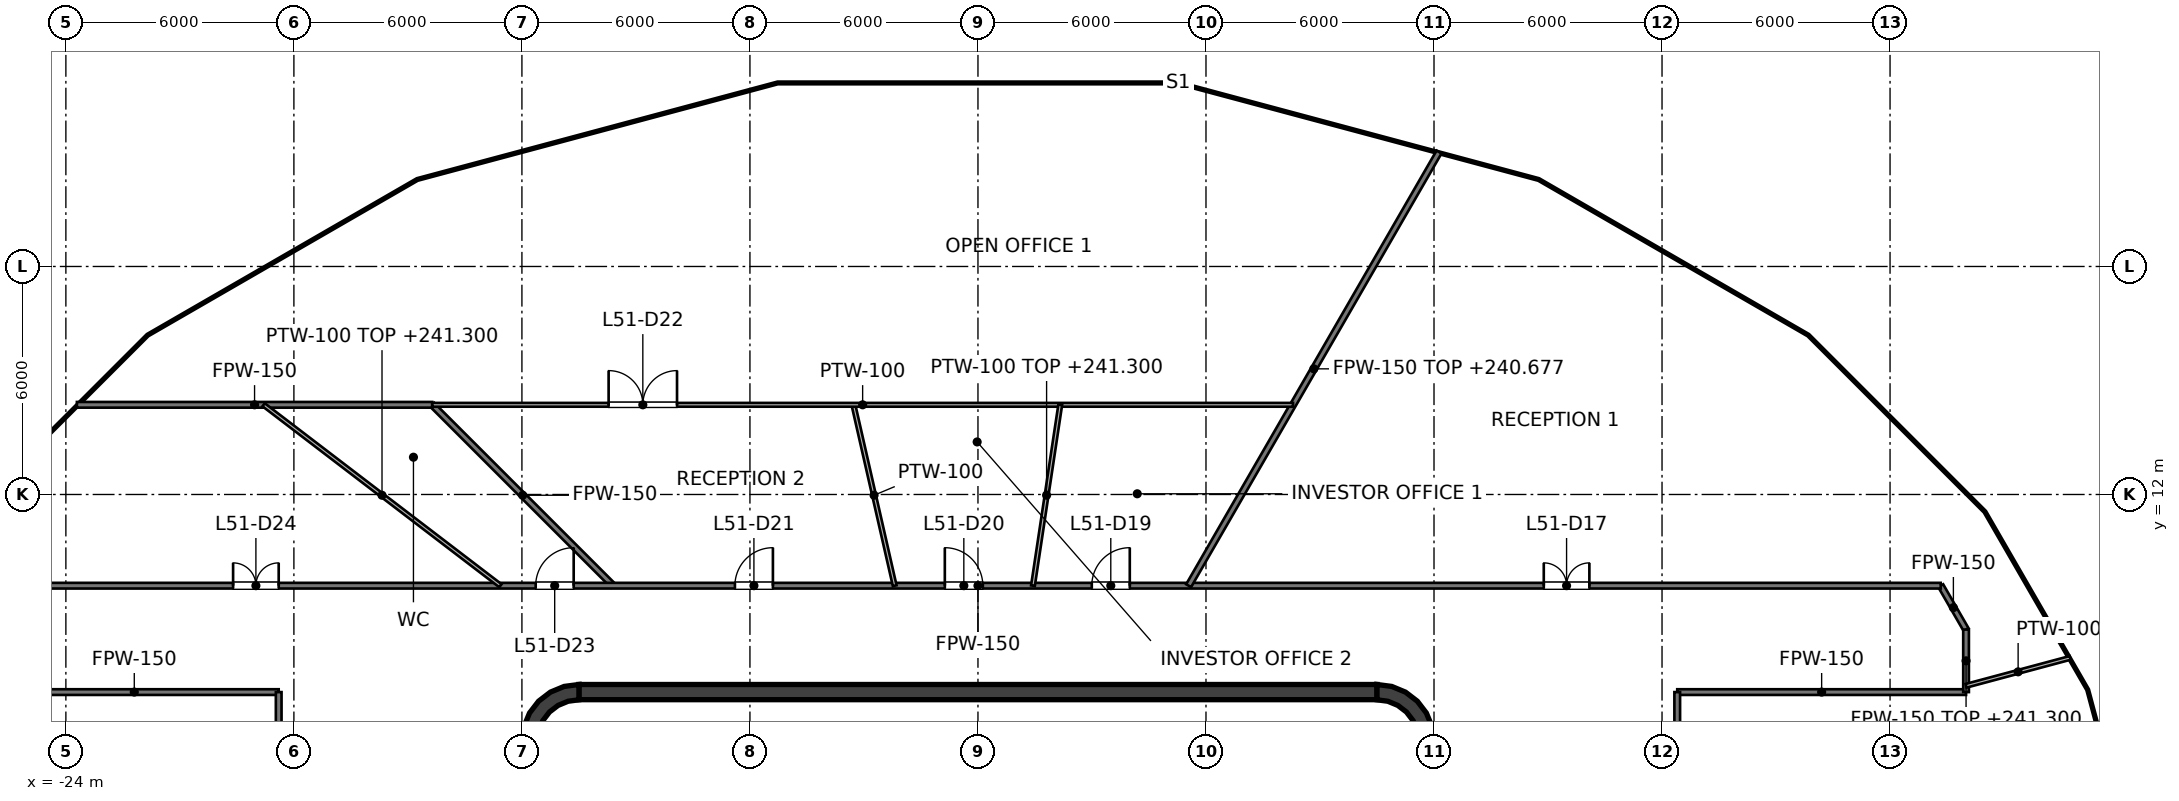
"""IFC4 building model, lengths in metres.
Left out: names, types, materials, properties, quantities, classifications, styles, units other than length and angle.
Written with IfcOpenShell. Run it as: python <this file> out.ifc"""

import sys

from ifc_helpers import new_model, si_unit, direction, frame, frame_2d, origin, place, context, subcontext, project, spatial, polyline, rectangle, outline, extrude, element, fill, save


model = new_model("IFC4")
c1 = context("Model", 3, precision=1e-05, world=origin(), true_north=direction((0.0, 1.0)))
c2 = subcontext(c1, "Body", "Model", "MODEL_VIEW")
j1 = project(units=[si_unit("LENGTHUNIT", "METRE"), si_unit("PLANEANGLEUNIT", "RADIAN")], contexts=[c1])
p1 = place(None, origin())
s1 = spatial("IfcSite", under=j1, at=p1, CompositionType="ELEMENT")
p2 = place(p1, origin())
s2 = spatial("IfcBuilding", under=s1, at=p2, CompositionType="ELEMENT")
p3 = place(p2, frame((0.0, 0.0, 237.6)))
s3 = spatial("IfcBuildingStorey", under=s2, at=p3, CompositionType="ELEMENT", Elevation=237.6)
p4 = place(p3, frame((-10.5, 6.8, 0.0), z_axis=(0.0, 0.0, 1.0), x_axis=(1.0, 0.0, 0.0)))
e1 = element("IfcWall", 1, at=p4, inside=s3, PredefinedType="SHEAR", context=c2, shape_type="SweptSolid", body=[
    extrude(rectangle(XDim=21.0, YDim=0.4, at=frame_2d((10.5, 0.0))), origin(), (0.0, 0.0, 1.0), 4.0),
])
p5 = place(p3, origin())
e2 = element("IfcWall", 2, at=p5, inside=s3, PredefinedType="SHEAR", context=c2, shape_type="SweptSolid", body=[
    extrude(outline(polyline([(10.5, 7.0), (10.5, 6.596), (10.784, 6.559), (11.048, 6.45), (11.275, 6.275), (11.45, 6.048), (11.559, 5.784), (11.596, 5.5), (12.0, 5.5), (11.949, 5.888), (11.799, 6.25), (11.561, 6.561), (11.25, 6.799), (10.888, 6.949), (10.5, 7.0)])), origin(), (0.0, 0.0, 1.0), 4.0),
])
e3 = element("IfcWall", 3, at=p5, inside=s3, PredefinedType="SHEAR", context=c2, shape_type="SweptSolid", body=[
    extrude(outline(polyline([(-12.0, 5.5), (-11.596, 5.5), (-11.559, 5.784), (-11.45, 6.048), (-11.275, 6.275), (-11.048, 6.45), (-10.784, 6.559), (-10.5, 6.596), (-10.5, 7.0), (-10.888, 6.949), (-11.25, 6.799), (-11.561, 6.561), (-11.799, 6.25), (-11.949, 5.888), (-12.0, 5.5)])), origin(), (0.0, 0.0, 1.0), 4.0),
])
p6 = place(p3, frame((-9.0, 4.1, 0.0), z_axis=(0.0, 0.0, 1.0), x_axis=(0.0, 1.0, 0.0)))
e4 = element("IfcWall", 4, at=p6, inside=s3, PredefinedType="SOLIDWALL", context=c2, shape_type="SweptSolid", body=[
    extrude(rectangle(XDim=2.5, YDim=0.25, at=frame_2d((1.25, 0.0))), origin(), (0.0, 0.0, 1.0), 3.85),
])
p7 = place(p6, frame((0.65, 0.0, 0.0)))
e5 = element("IfcOpeningElement", 5, at=p7, cuts=e4, PredefinedType="OPENING", context=c2, shape_type="SweptSolid", body=[
    extrude(rectangle(XDim=1.2, YDim=2.1, at=frame_2d((0.6, 1.05))), frame((0.0, 0.125, 0.0), z_axis=(0.0, -1.0, 0.0), x_axis=(1.0, 0.0, 0.0)), (0.0, 0.0, 1.0), 0.25),
])
p8 = place(p3, frame((9.0, 4.1, 0.0), z_axis=(0.0, 0.0, 1.0), x_axis=(0.0, 1.0, 0.0)))
e6 = element("IfcWall", 6, at=p8, inside=s3, PredefinedType="SOLIDWALL", context=c2, shape_type="SweptSolid", body=[
    extrude(rectangle(XDim=2.5, YDim=0.25, at=frame_2d((1.25, 0.0))), origin(), (0.0, 0.0, 1.0), 3.85),
])
p9 = place(p8, frame((0.65, 0.0, 0.0)))
e7 = element("IfcOpeningElement", 7, at=p9, cuts=e6, PredefinedType="OPENING", context=c2, shape_type="SweptSolid", body=[
    extrude(rectangle(XDim=1.2, YDim=2.1, at=frame_2d((0.6, 1.05))), frame((0.0, 0.125, 0.0), z_axis=(0.0, -1.0, 0.0), x_axis=(1.0, 0.0, 0.0)), (0.0, 0.0, 1.0), 0.25),
])
for number, where, z_axis, x_axis in (
    (8, (-3.15, 4.1, 0.0), (0.0, 0.0, 1.0), (0.0, 1.0, 0.0)),
    (9, (3.15, 4.1, 0.0), (0.0, 0.0, 1.0), (0.0, 1.0, 0.0)),
):
    element("IfcWall", number, at=place(p3, frame(where, z_axis=z_axis, x_axis=x_axis)), inside=s3, PredefinedType="SOLIDWALL", context=c2, shape_type="SweptSolid", body=[
        extrude(rectangle(XDim=2.5, YDim=0.25, at=frame_2d((1.25, 0.0))), origin(), (0.0, 0.0, 1.0), 3.85),
    ])
p10 = place(p3, frame((25.333, 9.6, 0.0), z_axis=(0.0, 0.0, 1.0), x_axis=(0.500076310463, -0.865981341435, 0.0)))
e10 = element("IfcWall", 10, at=p10, inside=s3, PredefinedType="PARTITIONING", context=c2, shape_type="SweptSolid", body=[
    extrude(rectangle(XDim=1.334, YDim=0.15, at=frame_2d((0.667, 0.0))), origin(), (0.0, 0.0, 1.0), 2.768),
])
p11 = place(p3, frame((-14.36, 14.36, 0.0), z_axis=(0.0, 0.0, 1.0), x_axis=(0.707106781187, -0.707106781187, 0.0)))
e11 = element("IfcWall", 11, at=p11, inside=s3, PredefinedType="PARTITIONING", context=c2, shape_type="SweptSolid", body=[
    extrude(rectangle(XDim=6.732, YDim=0.15, at=frame_2d((3.366, 0.0))), origin(), (0.0, 0.0, 1.0), 2.768),
])
for number, where, z_axis, x_axis in (
    (12, (-26.0, 6.8, 0.0), (0.0, 0.0, 1.0), (1.0, 0.0, 0.0)),
    (13, (18.4, 6.8, 0.0), (0.0, 0.0, 1.0), (1.0, 0.0, 0.0)),
):
    element("IfcWall", number, at=place(p3, frame(where, z_axis=z_axis, x_axis=x_axis)), inside=s3, PredefinedType="PARTITIONING", context=c2, shape_type="SweptSolid", body=[
        extrude(rectangle(XDim=7.6, YDim=0.15, at=frame_2d((3.8, 0.0))), origin(), (0.0, 0.0, 1.0), 2.768),
    ])
p12 = place(p3, frame((-25.333, 9.6, 0.0), z_axis=(0.0, 0.0, 1.0), x_axis=(1.0, 0.0, 0.0)))
e14 = element("IfcWall", 14, at=p12, inside=s3, PredefinedType="PARTITIONING", context=c2, shape_type="SweptSolid", body=[
    extrude(rectangle(XDim=50.666, YDim=0.15, at=frame_2d((25.333, 0.0))), origin(), (0.0, 0.0, 1.0), 2.768),
])
p13 = place(p12, frame((40.221, 0.0, 0.0)))
e15 = element("IfcOpeningElement", 15, at=p13, cuts=e14, PredefinedType="OPENING", context=c2, shape_type="SweptSolid", body=[
    extrude(rectangle(XDim=1.2, YDim=2.1, at=frame_2d((0.6, 1.05))), frame((0.0, 0.075, 0.0), z_axis=(0.0, -1.0, 0.0), x_axis=(1.0, 0.0, 0.0)), (0.0, 0.0, 1.0), 0.15),
])
p14 = place(p12, frame((28.328, 0.0, 0.0)))
e16 = element("IfcOpeningElement", 16, at=p14, cuts=e14, PredefinedType="OPENING", context=c2, shape_type="SweptSolid", body=[
    extrude(rectangle(XDim=1.0, YDim=2.1, at=frame_2d((0.5, 1.05))), frame((0.0, 0.075, 0.0), z_axis=(0.0, -1.0, 0.0), x_axis=(1.0, 0.0, 0.0)), (0.0, 0.0, 1.0), 0.15),
])
p15 = place(p12, frame((24.461, 0.0, 0.0)))
e17 = element("IfcOpeningElement", 17, at=p15, cuts=e14, PredefinedType="OPENING", context=c2, shape_type="SweptSolid", body=[
    extrude(rectangle(XDim=1.0, YDim=2.1, at=frame_2d((0.5, 1.05))), frame((0.0, 0.075, 0.0), z_axis=(0.0, -1.0, 0.0), x_axis=(1.0, 0.0, 0.0)), (0.0, 0.0, 1.0), 0.15),
])
p16 = place(p12, frame((18.938, 0.0, 0.0)))
e18 = element("IfcOpeningElement", 18, at=p16, cuts=e14, PredefinedType="OPENING", context=c2, shape_type="SweptSolid", body=[
    extrude(rectangle(XDim=1.0, YDim=2.1, at=frame_2d((0.5, 1.05))), frame((0.0, 0.075, 0.0), z_axis=(0.0, -1.0, 0.0), x_axis=(1.0, 0.0, 0.0)), (0.0, 0.0, 1.0), 0.15),
])
p17 = place(p12, frame((13.695, 0.0, 0.0)))
e19 = element("IfcOpeningElement", 19, at=p17, cuts=e14, PredefinedType="OPENING", context=c2, shape_type="SweptSolid", body=[
    extrude(rectangle(XDim=1.0, YDim=2.1, at=frame_2d((0.5, 1.05))), frame((0.0, 0.075, 0.0), z_axis=(0.0, -1.0, 0.0), x_axis=(1.0, 0.0, 0.0)), (0.0, 0.0, 1.0), 0.15),
])
p18 = place(p12, frame((5.733, 0.0, 0.0)))
e20 = element("IfcOpeningElement", 20, at=p18, cuts=e14, PredefinedType="OPENING", context=c2, shape_type="SweptSolid", body=[
    extrude(rectangle(XDim=1.2, YDim=2.1, at=frame_2d((0.6, 1.05))), frame((0.0, 0.075, 0.0), z_axis=(0.0, -1.0, 0.0), x_axis=(1.0, 0.0, 0.0)), (0.0, 0.0, 1.0), 0.15),
])
p19 = place(p3, frame((-23.71, 14.36, 0.0), z_axis=(0.0, 0.0, 1.0), x_axis=(1.0, 0.0, 0.0)))
e21 = element("IfcWall", 21, at=p19, inside=s3, PredefinedType="PARTITIONING", context=c2, shape_type="SweptSolid", body=[
    extrude(rectangle(XDim=9.35, YDim=0.15, at=frame_2d((4.675, 0.0))), origin(), (0.0, 0.0, 1.0), 2.768),
])
p20 = place(p3, frame((5.543, 9.6, 0.0), z_axis=(0.0, 0.0, 1.0), x_axis=(0.500044242988, 0.865999858577, 0.0)))
e22 = element("IfcWall", 22, at=p20, inside=s3, PredefinedType="PARTITIONING", context=c2, shape_type="SweptSolid", body=[
    extrude(rectangle(XDim=13.178, YDim=0.15, at=frame_2d((6.589, 0.0))), origin(), (0.0, 0.0, 1.0), 3.077),
])
p21 = place(p3, frame((26.0, 6.8, 0.0), z_axis=(0.0, 0.0, 1.0), x_axis=(0.0, 1.0, 0.0)))
e23 = element("IfcWall", 23, at=p21, inside=s3, PredefinedType="PARTITIONING", context=c2, shape_type="SweptSolid", body=[
    extrude(rectangle(XDim=1.645, YDim=0.15, at=frame_2d((0.823, 0.0))), origin(), (0.0, 0.0, 1.0), 3.7),
])
p22 = place(p3, frame((18.4, -6.8, 0.0), z_axis=(0.0, 0.0, 1.0), x_axis=(0.0, 1.0, 0.0)))
e24 = element("IfcWall", 24, at=p22, inside=s3, PredefinedType="PARTITIONING", context=c2, shape_type="SweptSolid", body=[
    extrude(rectangle(XDim=13.6, YDim=0.15, at=frame_2d((6.8, 0.0))), origin(), (0.0, 0.0, 1.0), 2.768),
])
p23 = place(p22, frame((6.2, 0.0, 0.0)))
e25 = element("IfcOpeningElement", 25, at=p23, cuts=e24, PredefinedType="OPENING", context=c2, shape_type="SweptSolid", body=[
    extrude(rectangle(XDim=1.2, YDim=2.1, at=frame_2d((0.6, 1.05))), frame((0.0, 0.075, 0.0), z_axis=(0.0, -1.0, 0.0), x_axis=(1.0, 0.0, 0.0)), (0.0, 0.0, 1.0), 0.15),
])
p24 = place(p3, frame((-18.4, -6.8, 0.0), z_axis=(0.0, 0.0, 1.0), x_axis=(0.0, 1.0, 0.0)))
e26 = element("IfcWall", 26, at=p24, inside=s3, PredefinedType="PARTITIONING", context=c2, shape_type="SweptSolid", body=[
    extrude(rectangle(XDim=13.6, YDim=0.15, at=frame_2d((6.8, 0.0))), origin(), (0.0, 0.0, 1.0), 2.768),
])
p25 = place(p3, frame((-3.277, 14.36, 0.0), z_axis=(0.0, 0.0, 1.0), x_axis=(0.222470409815, -0.97493944261, 0.0)))
e27 = element("IfcWall", 27, at=p25, inside=s3, PredefinedType="PARTITIONING", context=c2, shape_type="SweptSolid", body=[
    extrude(rectangle(XDim=4.882, YDim=0.1, at=frame_2d((2.441, 0.0))), origin(), (0.0, 0.0, 1.0), 2.768),
])
p26 = place(p3, frame((-18.797, 14.36, 0.0), z_axis=(0.0, 0.0, 1.0), x_axis=(0.794667043869, -0.607045541445, 0.0)))
e28 = element("IfcWall", 28, at=p26, inside=s3, PredefinedType="PARTITIONING", context=c2, shape_type="SweptSolid", body=[
    extrude(rectangle(XDim=7.841, YDim=0.1, at=frame_2d((3.921, 0.0))), origin(), (0.0, 0.0, 1.0), 3.7),
])
p27 = place(p3, frame((-14.36, 14.36, 0.0), z_axis=(0.0, 0.0, 1.0), x_axis=(1.0, 0.0, 0.0)))
e29 = element("IfcWall", 29, at=p27, inside=s3, PredefinedType="PARTITIONING", context=c2, shape_type="SweptSolid", body=[
    extrude(rectangle(XDim=22.651, YDim=0.1, at=frame_2d((11.326, 0.0))), origin(), (0.0, 0.0, 1.0), 2.768),
])
p28 = place(p27, frame((4.642, 0.0, 0.0)))
e30 = element("IfcOpeningElement", 30, at=p28, cuts=e29, PredefinedType="OPENING", context=c2, shape_type="SweptSolid", body=[
    extrude(rectangle(XDim=1.8, YDim=2.1, at=frame_2d((0.9, 1.05))), frame((0.0, 0.05, 0.0), z_axis=(0.0, -1.0, 0.0), x_axis=(1.0, 0.0, 0.0)), (0.0, 0.0, 1.0), 0.1),
])
p29 = place(p3, frame((26.0, 6.966, 0.0), z_axis=(0.0, 0.0, 1.0), x_axis=(0.965951508514, 0.258723178704, 0.0)))
e31 = element("IfcWall", 31, at=p29, inside=s3, PredefinedType="PARTITIONING", context=c2, shape_type="SweptSolid", body=[
    extrude(rectangle(XDim=2.837, YDim=0.1, at=frame_2d((1.418, 0.0))), origin(), (0.0, 0.0, 1.0), 3.325),
])
p30 = place(p3, frame((1.447, 9.6, 0.0), z_axis=(0.0, 0.0, 1.0), x_axis=(0.149156325557, 0.988813627812, 0.0)))
e32 = element("IfcWall", 32, at=p30, inside=s3, PredefinedType="PARTITIONING", context=c2, shape_type="SweptSolid", body=[
    extrude(rectangle(XDim=4.814, YDim=0.1, at=frame_2d((2.407, 0.0))), origin(), (0.0, 0.0, 1.0), 3.7),
])
p31 = place(p13, origin())
e33 = element("IfcDoor", 33, at=p31, inside=s3, OperationType="DOUBLE_DOOR_SINGLE_SWING", PredefinedType="DOOR", context=c2, shape_type="SweptSolid", body=[
    extrude(rectangle(XDim=1.2, YDim=2.1, at=frame_2d((0.6, 1.05))), frame((0.0, 0.025, 0.0), z_axis=(0.0, -1.0, 0.0), x_axis=(1.0, 0.0, 0.0)), (0.0, 0.0, 1.0), 0.05),
])
fill(e15, e33)
p32 = place(p14, origin())
e34 = element("IfcDoor", 34, at=p32, inside=s3, OperationType="SINGLE_SWING_RIGHT", PredefinedType="DOOR", context=c2, shape_type="SweptSolid", body=[
    extrude(rectangle(XDim=1.0, YDim=2.1, at=frame_2d((0.5, 1.05))), frame((0.0, 0.025, 0.0), z_axis=(0.0, -1.0, 0.0), x_axis=(1.0, 0.0, 0.0)), (0.0, 0.0, 1.0), 0.05),
])
fill(e16, e34)
p33 = place(p15, origin())
e35 = element("IfcDoor", 35, at=p33, inside=s3, OperationType="SINGLE_SWING_LEFT", PredefinedType="DOOR", context=c2, shape_type="SweptSolid", body=[
    extrude(rectangle(XDim=1.0, YDim=2.1, at=frame_2d((0.5, 1.05))), frame((0.0, 0.025, 0.0), z_axis=(0.0, -1.0, 0.0), x_axis=(1.0, 0.0, 0.0)), (0.0, 0.0, 1.0), 0.05),
])
fill(e17, e35)
p34 = place(p16, origin())
e36 = element("IfcDoor", 36, at=p34, inside=s3, OperationType="SINGLE_SWING_RIGHT", PredefinedType="DOOR", context=c2, shape_type="SweptSolid", body=[
    extrude(rectangle(XDim=1.0, YDim=2.1, at=frame_2d((0.5, 1.05))), frame((0.0, 0.025, 0.0), z_axis=(0.0, -1.0, 0.0), x_axis=(1.0, 0.0, 0.0)), (0.0, 0.0, 1.0), 0.05),
])
fill(e18, e36)
p35 = place(p28, origin())
e37 = element("IfcDoor", 37, at=p35, inside=s3, OperationType="DOUBLE_DOOR_SINGLE_SWING", PredefinedType="DOOR", context=c2, shape_type="SweptSolid", body=[
    extrude(rectangle(XDim=1.8, YDim=2.1, at=frame_2d((0.9, 1.05))), frame((0.0, 0.025, 0.0), z_axis=(0.0, -1.0, 0.0), x_axis=(1.0, 0.0, 0.0)), (0.0, 0.0, 1.0), 0.05),
])
fill(e30, e37)
p36 = place(p17, origin())
e38 = element("IfcDoor", 38, at=p36, inside=s3, OperationType="SINGLE_SWING_RIGHT", PredefinedType="DOOR", context=c2, shape_type="SweptSolid", body=[
    extrude(rectangle(XDim=1.0, YDim=2.1, at=frame_2d((0.5, 1.05))), frame((0.0, 0.025, 0.0), z_axis=(0.0, -1.0, 0.0), x_axis=(1.0, 0.0, 0.0)), (0.0, 0.0, 1.0), 0.05),
])
fill(e19, e38)
p37 = place(p18, origin())
e39 = element("IfcDoor", 39, at=p37, inside=s3, OperationType="DOUBLE_DOOR_SINGLE_SWING", PredefinedType="DOOR", context=c2, shape_type="SweptSolid", body=[
    extrude(rectangle(XDim=1.2, YDim=2.1, at=frame_2d((0.6, 1.05))), frame((0.0, 0.025, 0.0), z_axis=(0.0, -1.0, 0.0), x_axis=(1.0, 0.0, 0.0)), (0.0, 0.0, 1.0), 0.05),
])
fill(e20, e39)
save(model, sys.argv[1])
